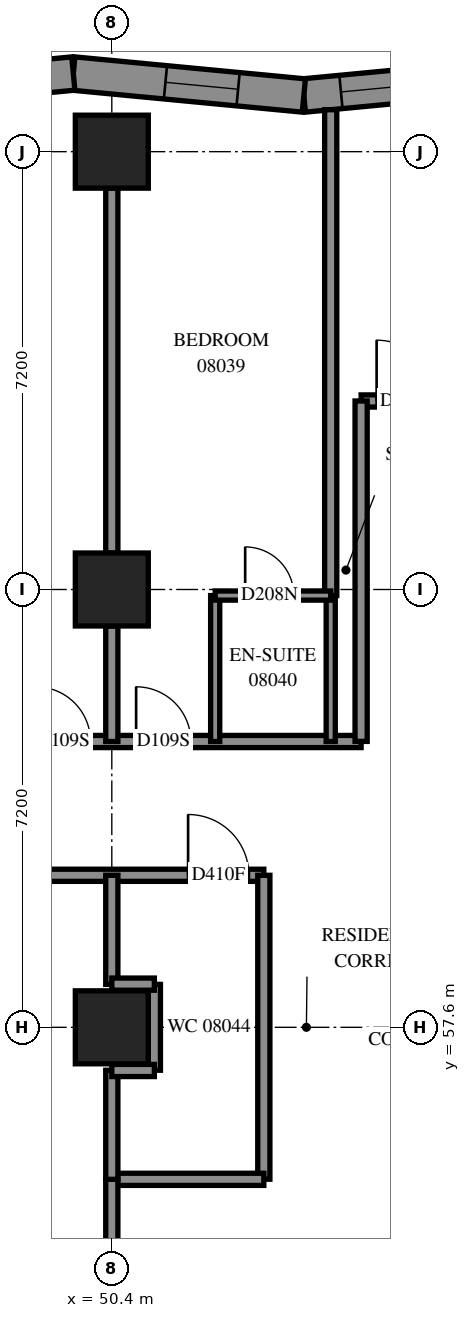
"""IFC4 building model, lengths in metres.
Left out: names, types, materials, properties, quantities, classifications, styles, units other than length and angle.
Written with IfcOpenShell. Run it as: python <this file> out.ifc"""

import sys

from ifc_helpers import new_model, si_unit, direction, frame, frame_2d, origin, origin_2d, place, context, subcontext, project, spatial, polyline, rectangle, outline, extrude, element, fill, save


model = new_model("IFC4")
c1 = context("Model", 3, precision=1e-05, world=origin(), true_north=direction((0.0, 1.0)))
c2 = subcontext(c1, "Body", "Model", "MODEL_VIEW")
j1 = project(units=[si_unit("LENGTHUNIT", "METRE"), si_unit("PLANEANGLEUNIT", "RADIAN")], contexts=[c1])
p1 = place(None, origin())
s1 = spatial("IfcSite", under=j1, at=p1, CompositionType="ELEMENT")
p2 = place(p1, origin())
s2 = spatial("IfcBuilding", under=s1, at=p2, CompositionType="ELEMENT")
p3 = place(p2, frame((0.0, 0.0, 33.8)))
s3 = spatial("IfcBuildingStorey", under=s2, at=p3, CompositionType="ELEMENT", Elevation=33.8)
for number, where, z_axis, x_axis in (
    (1, (50.4, 57.6, 0.0), (0.0, 0.0, 1.0), (1.0, 0.0, 0.0)),
    (2, (50.4, 64.8, 0.0), (0.0, 0.0, 1.0), (1.0, 0.0, 0.0)),
    (3, (50.4, 72.0, 0.0), (0.0, 0.0, 1.0), (1.0, 0.0, 0.0)),
):
    element("IfcColumn", number, at=place(p3, frame(where, z_axis=z_axis, x_axis=x_axis)), inside=s3, PredefinedType="COLUMN", context=c2, shape_type="SweptSolid", body=[
        extrude(rectangle(XDim=1.2, YDim=1.2, at=origin_2d()), origin(), (0.0, 0.0, 1.0), 3.1),
    ])
p4 = place(p3, frame((57.349, 73.285, 0.0), z_axis=(0.0, 0.0, 1.0), x_axis=(-0.9954966527, -0.0947967005, 0.0)))
e4 = element("IfcWall", 4, at=p4, inside=s3, PredefinedType="SOLIDWALL", context=c2, shape_type="SweptSolid", body=[
    extrude(outline(polyline([(-0.026, -0.275), (3.782, -0.275), (3.834, 0.275), (0.026, 0.275), (-0.026, -0.275)])), origin(), (0.0, 0.0, 1.0), 3.1),
])
p5 = place(p4, frame((0.395, 0.0, 0.5)))
e5 = element("IfcOpeningElement", 5, at=p5, cuts=e4, PredefinedType="OPENING", context=c2, shape_type="SweptSolid", body=[
    extrude(rectangle(XDim=2.8, YDim=2.45, at=frame_2d((1.4, 1.225))), frame((0.0, 0.285, 0.0), z_axis=(0.0, -1.0, 0.0), x_axis=(1.0, 0.0, 0.0)), (0.0, 0.0, 1.0), 0.57),
])
p6 = place(p3, frame((53.558, 72.924, 0.0), z_axis=(0.0, 0.0, 1.0), x_axis=(-0.9954966527, 0.0947967005, 0.0)))
e6 = element("IfcWall", 6, at=p6, inside=s3, PredefinedType="SOLIDWALL", context=c2, shape_type="SweptSolid", body=[
    extrude(outline(polyline([(0.026, -0.275), (3.834, -0.275), (3.782, 0.275), (-0.026, 0.275), (0.026, -0.275)])), origin(), (0.0, 0.0, 1.0), 3.1),
])
p7 = place(p6, frame((1.086, 0.0, 0.5)))
e7 = element("IfcOpeningElement", 7, at=p7, cuts=e6, PredefinedType="OPENING", context=c2, shape_type="SweptSolid", body=[
    extrude(rectangle(XDim=1.2, YDim=2.45, at=frame_2d((0.6, 1.225))), frame((0.0, 0.285, 0.0), z_axis=(0.0, -1.0, 0.0), x_axis=(1.0, 0.0, 0.0)), (0.0, 0.0, 1.0), 0.57),
])
p8 = place(p3, frame((49.767, 73.285, 0.0), z_axis=(0.0, 0.0, 1.0), x_axis=(-0.9954966527, -0.0947967005, 0.0)))
e8 = element("IfcWall", 8, at=p8, inside=s3, PredefinedType="SOLIDWALL", context=c2, shape_type="SweptSolid", body=[
    extrude(outline(polyline([(-0.026, -0.275), (3.782, -0.275), (3.834, 0.275), (0.026, 0.275), (-0.026, -0.275)])), origin(), (0.0, 0.0, 1.0), 3.1),
])
p9 = place(p8, frame((1.003, 0.0, 0.5)))
e9 = element("IfcOpeningElement", 9, at=p9, cuts=e8, PredefinedType="OPENING", context=c2, shape_type="SweptSolid", body=[
    extrude(rectangle(XDim=1.2, YDim=2.45, at=frame_2d((0.6, 1.225))), frame((0.0, 0.285, 0.0), z_axis=(0.0, -1.0, 0.0), x_axis=(1.0, 0.0, 0.0)), (0.0, 0.0, 1.0), 0.57),
])
p10 = place(p3, frame((28.8, 60.1, 0.0), z_axis=(0.0, 0.0, 1.0), x_axis=(1.0, 0.0, 0.0)))
e10 = element("IfcWall", 10, at=p10, inside=s3, PredefinedType="PARTITIONING", context=c2, shape_type="SweptSolid", body=[
    extrude(rectangle(XDim=24.1, YDim=0.2, at=frame_2d((12.05, 0.0))), origin(), (0.0, 0.0, 1.0), 3.1),
])
p11 = place(p10, frame((4.125, 0.0, 0.0)))
e11 = element("IfcOpeningElement", 11, at=p11, cuts=e10, PredefinedType="OPENING", context=c2, shape_type="SweptSolid", body=[
    extrude(rectangle(XDim=1.0, YDim=2.1, at=frame_2d((0.5, 1.05))), frame((0.0, 0.11, 0.0), z_axis=(0.0, -1.0, 0.0), x_axis=(1.0, 0.0, 0.0)), (0.0, 0.0, 1.0), 0.22),
])
p12 = place(p10, frame((11.62, 0.0, 0.0)))
e12 = element("IfcOpeningElement", 12, at=p12, cuts=e10, PredefinedType="OPENING", context=c2, shape_type="SweptSolid", body=[
    extrude(rectangle(XDim=0.9, YDim=2.1, at=frame_2d((0.45, 1.05))), frame((0.0, 0.11, 0.0), z_axis=(0.0, -1.0, 0.0), x_axis=(1.0, 0.0, 0.0)), (0.0, 0.0, 1.0), 0.22),
])
p13 = place(p10, frame((14.8, 0.0, 0.0)))
e13 = element("IfcOpeningElement", 13, at=p13, cuts=e10, PredefinedType="OPENING", context=c2, shape_type="SweptSolid", body=[
    extrude(rectangle(XDim=0.9, YDim=2.1, at=frame_2d((0.45, 1.05))), frame((0.0, 0.11, 0.0), z_axis=(0.0, -1.0, 0.0), x_axis=(1.0, 0.0, 0.0)), (0.0, 0.0, 1.0), 0.22),
])
p14 = place(p10, frame((18.835, 0.0, 0.0)))
e14 = element("IfcOpeningElement", 14, at=p14, cuts=e10, PredefinedType="OPENING", context=c2, shape_type="SweptSolid", body=[
    extrude(rectangle(XDim=1.0, YDim=2.1, at=frame_2d((0.5, 1.05))), frame((0.0, 0.11, 0.0), z_axis=(0.0, -1.0, 0.0), x_axis=(1.0, 0.0, 0.0)), (0.0, 0.0, 1.0), 0.22),
])
p15 = place(p10, frame((22.854, 0.0, 0.0)))
e15 = element("IfcOpeningElement", 15, at=p15, cuts=e10, PredefinedType="OPENING", context=c2, shape_type="SweptSolid", body=[
    extrude(rectangle(XDim=1.0, YDim=2.1, at=frame_2d((0.5, 1.05))), frame((0.0, 0.11, 0.0), z_axis=(0.0, -1.0, 0.0), x_axis=(1.0, 0.0, 0.0)), (0.0, 0.0, 1.0), 0.22),
])
p16 = place(p3, frame((33.502, 62.3, 0.0), z_axis=(0.0, 0.0, 1.0), x_axis=(1.0, 0.0, 0.0)))
e16 = element("IfcWall", 16, at=p16, inside=s3, PredefinedType="PARTITIONING", context=c2, shape_type="SweptSolid", body=[
    extrude(rectangle(XDim=20.998, YDim=0.2, at=frame_2d((10.499, 0.0))), origin(), (0.0, 0.0, 1.0), 3.1),
])
p17 = place(p16, frame((2.898, 0.0, 0.0)))
e17 = element("IfcOpeningElement", 17, at=p17, cuts=e16, PredefinedType="OPENING", context=c2, shape_type="SweptSolid", body=[
    extrude(rectangle(XDim=0.9, YDim=2.1, at=frame_2d((0.45, 1.05))), frame((0.0, 0.11, 0.0), z_axis=(0.0, -1.0, 0.0), x_axis=(1.0, 0.0, 0.0)), (0.0, 0.0, 1.0), 0.22),
])
p18 = place(p16, frame((8.448, 0.0, 0.0)))
e18 = element("IfcOpeningElement", 18, at=p18, cuts=e16, PredefinedType="OPENING", context=c2, shape_type="SweptSolid", body=[
    extrude(rectangle(XDim=0.9, YDim=2.1, at=frame_2d((0.45, 1.05))), frame((0.0, 0.11, 0.0), z_axis=(0.0, -1.0, 0.0), x_axis=(1.0, 0.0, 0.0)), (0.0, 0.0, 1.0), 0.22),
])
p19 = place(p16, frame((10.098, 0.0, 0.0)))
e19 = element("IfcOpeningElement", 19, at=p19, cuts=e16, PredefinedType="OPENING", context=c2, shape_type="SweptSolid", body=[
    extrude(rectangle(XDim=0.9, YDim=2.1, at=frame_2d((0.45, 1.05))), frame((0.0, 0.11, 0.0), z_axis=(0.0, -1.0, 0.0), x_axis=(1.0, 0.0, 0.0)), (0.0, 0.0, 1.0), 0.22),
])
p20 = place(p16, frame((15.648, 0.0, 0.0)))
e20 = element("IfcOpeningElement", 20, at=p20, cuts=e16, PredefinedType="OPENING", context=c2, shape_type="SweptSolid", body=[
    extrude(rectangle(XDim=0.9, YDim=2.1, at=frame_2d((0.45, 1.05))), frame((0.0, 0.11, 0.0), z_axis=(0.0, -1.0, 0.0), x_axis=(1.0, 0.0, 0.0)), (0.0, 0.0, 1.0), 0.22),
])
p21 = place(p16, frame((17.298, 0.0, 0.0)))
e21 = element("IfcOpeningElement", 21, at=p21, cuts=e16, PredefinedType="OPENING", context=c2, shape_type="SweptSolid", body=[
    extrude(rectangle(XDim=0.9, YDim=2.1, at=frame_2d((0.45, 1.05))), frame((0.0, 0.11, 0.0), z_axis=(0.0, -1.0, 0.0), x_axis=(1.0, 0.0, 0.0)), (0.0, 0.0, 1.0), 0.22),
])
p22 = place(p3, frame((54.5, 67.9, 0.0), z_axis=(0.0, 0.0, 1.0), x_axis=(1.0, 0.0, 0.0)))
e22 = element("IfcWall", 22, at=p22, inside=s3, PredefinedType="PARTITIONING", context=c2, shape_type="SweptSolid", body=[
    extrude(rectangle(XDim=20.6, YDim=0.2, at=frame_2d((10.3, 0.0))), origin(), (0.0, 0.0, 1.0), 3.1),
])
p23 = place(p22, frame((0.255, 0.0, 0.0)))
e23 = element("IfcOpeningElement", 23, at=p23, cuts=e22, PredefinedType="OPENING", context=c2, shape_type="SweptSolid", body=[
    extrude(rectangle(XDim=1.0, YDim=2.1, at=frame_2d((0.5, 1.05))), frame((0.0, 0.11, 0.0), z_axis=(0.0, -1.0, 0.0), x_axis=(1.0, 0.0, 0.0)), (0.0, 0.0, 1.0), 0.22),
])
p24 = place(p22, frame((19.345, 0.0, 0.0)))
e24 = element("IfcOpeningElement", 24, at=p24, cuts=e22, PredefinedType="OPENING", context=c2, shape_type="SweptSolid", body=[
    extrude(rectangle(XDim=1.0, YDim=2.1, at=frame_2d((0.5, 1.05))), frame((0.0, 0.11, 0.0), z_axis=(0.0, -1.0, 0.0), x_axis=(1.0, 0.0, 0.0)), (0.0, 0.0, 1.0), 0.22),
])
p25 = place(p22, frame((5.45, 0.0, 0.0)))
e25 = element("IfcOpeningElement", 25, at=p25, cuts=e22, PredefinedType="OPENING", context=c2, shape_type="SweptSolid", body=[
    extrude(rectangle(XDim=0.9, YDim=2.1, at=frame_2d((0.45, 1.05))), frame((0.0, 0.11, 0.0), z_axis=(0.0, -1.0, 0.0), x_axis=(1.0, 0.0, 0.0)), (0.0, 0.0, 1.0), 0.22),
])
p26 = place(p22, frame((7.1, 0.0, 0.0)))
e26 = element("IfcOpeningElement", 26, at=p26, cuts=e22, PredefinedType="OPENING", context=c2, shape_type="SweptSolid", body=[
    extrude(rectangle(XDim=0.9, YDim=2.1, at=frame_2d((0.45, 1.05))), frame((0.0, 0.11, 0.0), z_axis=(0.0, -1.0, 0.0), x_axis=(1.0, 0.0, 0.0)), (0.0, 0.0, 1.0), 0.22),
])
p27 = place(p22, frame((12.65, 0.0, 0.0)))
e27 = element("IfcOpeningElement", 27, at=p27, cuts=e22, PredefinedType="OPENING", context=c2, shape_type="SweptSolid", body=[
    extrude(rectangle(XDim=0.9, YDim=2.1, at=frame_2d((0.45, 1.05))), frame((0.0, 0.11, 0.0), z_axis=(0.0, -1.0, 0.0), x_axis=(1.0, 0.0, 0.0)), (0.0, 0.0, 1.0), 0.22),
])
p28 = place(p22, frame((14.3, 0.0, 0.0)))
e28 = element("IfcOpeningElement", 28, at=p28, cuts=e22, PredefinedType="OPENING", context=c2, shape_type="SweptSolid", body=[
    extrude(rectangle(XDim=0.9, YDim=2.1, at=frame_2d((0.45, 1.05))), frame((0.0, 0.11, 0.0), z_axis=(0.0, -1.0, 0.0), x_axis=(1.0, 0.0, 0.0)), (0.0, 0.0, 1.0), 0.22),
])
p29 = place(p3, frame((54.0, 64.7, 0.0), z_axis=(0.0, 0.0, 1.0), x_axis=(0.0, 1.0, 0.0)))
e29 = element("IfcWall", 29, at=p29, inside=s3, PredefinedType="PARTITIONING", context=c2, shape_type="SweptSolid", body=[
    extrude(rectangle(XDim=7.99, YDim=0.2, at=frame_2d((3.995, 0.0))), origin(), (0.0, 0.0, 1.0), 3.1),
])
p30 = place(p3, frame((50.4, 65.4, 0.0), z_axis=(0.0, 0.0, 1.0), x_axis=(0.0, 1.0, 0.0)))
e30 = element("IfcWall", 30, at=p30, inside=s3, PredefinedType="PARTITIONING", context=c2, shape_type="SweptSolid", body=[
    extrude(rectangle(XDim=6.0, YDim=0.2, at=frame_2d((3.0, 0.0))), origin(), (0.0, 0.0, 1.0), 3.1),
])
p31 = place(p3, frame((54.5, 62.302, 0.0), z_axis=(0.0, 0.0, 1.0), x_axis=(0.0, 1.0, 0.0)))
e31 = element("IfcWall", 31, at=p31, inside=s3, PredefinedType="PARTITIONING", context=c2, shape_type="SweptSolid", body=[
    extrude(rectangle(XDim=5.598, YDim=0.2, at=frame_2d((2.799, 0.0))), origin(), (0.0, 0.0, 1.0), 3.1),
])
p32 = place(p3, frame((52.9, 55.102, 0.0), z_axis=(0.0, 0.0, 1.0), x_axis=(0.0, 1.0, 0.0)))
e32 = element("IfcWall", 32, at=p32, inside=s3, PredefinedType="PARTITIONING", context=c2, shape_type="SweptSolid", body=[
    extrude(rectangle(XDim=4.998, YDim=0.2, at=frame_2d((2.499, 0.0))), origin(), (0.0, 0.0, 1.0), 3.1),
])
p33 = place(p3, frame((50.4, 55.1, 0.0), z_axis=(0.0, 0.0, 1.0), x_axis=(1.0, 0.0, 0.0)))
e33 = element("IfcWall", 33, at=p33, inside=s3, PredefinedType="PARTITIONING", context=c2, shape_type="SweptSolid", body=[
    extrude(rectangle(XDim=2.5, YDim=0.2, at=frame_2d((1.25, 0.0))), origin(), (0.0, 0.0, 1.0), 3.1),
])
for number, where, z_axis, x_axis in (
    (34, (52.1, 62.3, 0.0), (0.0, 0.0, 1.0), (0.0, 1.0, 0.0)),
    (35, (54.0, 62.3, 0.0), (0.0, 0.0, 1.0), (0.0, 1.0, 0.0)),
):
    element("IfcWall", number, at=place(p3, frame(where, z_axis=z_axis, x_axis=x_axis)), inside=s3, PredefinedType="PARTITIONING", context=c2, shape_type="SweptSolid", body=[
        extrude(rectangle(XDim=2.4, YDim=0.15, at=frame_2d((1.2, 0.0))), origin(), (0.0, 0.0, 1.0), 3.1),
    ])
p34 = place(p3, frame((50.4, 52.9, 0.0), z_axis=(0.0, 0.0, 1.0), x_axis=(0.0, 1.0, 0.0)))
e36 = element("IfcWall", 36, at=p34, inside=s3, PredefinedType="PARTITIONING", context=c2, shape_type="SweptSolid", body=[
    extrude(rectangle(XDim=2.2, YDim=0.2, at=frame_2d((1.1, 0.0))), origin(), (0.0, 0.0, 1.0), 3.1),
])
p35 = place(p3, frame((50.4, 62.3, 0.0), z_axis=(0.0, 0.0, 1.0), x_axis=(0.0, 1.0, 0.0)))
e37 = element("IfcWall", 37, at=p35, inside=s3, PredefinedType="PARTITIONING", context=c2, shape_type="SweptSolid", body=[
    extrude(rectangle(XDim=1.9, YDim=0.2, at=frame_2d((0.95, 0.0))), origin(), (0.0, 0.0, 1.0), 3.1),
])
p36 = place(p3, frame((52.1, 64.7, 0.0), z_axis=(0.0, 0.0, 1.0), x_axis=(1.0, 0.0, 0.0)))
e38 = element("IfcWall", 38, at=p36, inside=s3, PredefinedType="PARTITIONING", context=c2, shape_type="SweptSolid", body=[
    extrude(rectangle(XDim=1.9, YDim=0.15, at=frame_2d((0.95, 0.0))), origin(), (0.0, 0.0, 1.0), 3.1),
])
p37 = place(p36, frame((0.493, 0.0, 0.0)))
e39 = element("IfcOpeningElement", 39, at=p37, cuts=e38, PredefinedType="OPENING", context=c2, shape_type="SweptSolid", body=[
    extrude(rectangle(XDim=0.8, YDim=2.1, at=frame_2d((0.4, 1.05))), frame((0.0, 0.085, 0.0), z_axis=(0.0, -1.0, 0.0), x_axis=(1.0, 0.0, 0.0)), (0.0, 0.0, 1.0), 0.17),
])
for number, where, z_axis, x_axis in (
    (40, (50.4, 58.306, 0.0), (0.0, 0.0, 1.0), (0.0, 1.0, 0.0)),
    (41, (50.4, 55.1, 0.0), (0.0, 0.0, 1.0), (0.0, 1.0, 0.0)),
):
    element("IfcWall", number, at=place(p3, frame(where, z_axis=z_axis, x_axis=x_axis)), inside=s3, PredefinedType="PARTITIONING", context=c2, shape_type="SweptSolid", body=[
        extrude(rectangle(XDim=1.794, YDim=0.2, at=frame_2d((0.897, 0.0))), origin(), (0.0, 0.0, 1.0), 3.1),
    ])
p38 = place(p3, frame((51.1, 56.894, 0.0), z_axis=(0.0, 0.0, 1.0), x_axis=(0.0, 1.0, 0.0)))
e42 = element("IfcWall", 42, at=p38, inside=s3, PredefinedType="PARTITIONING", context=c2, shape_type="SweptSolid", body=[
    extrude(rectangle(XDim=1.412, YDim=0.2, at=frame_2d((0.706, 0.0))), origin(), (0.0, 0.0, 1.0), 3.1),
])
for number, where, z_axis, x_axis in (
    (43, (50.4, 58.31, 0.0), (0.0, 0.0, 1.0), (1.0, 0.0, 0.0)),
    (44, (50.4, 56.89, 0.0), (0.0, 0.0, 1.0), (1.0, 0.0, 0.0)),
):
    element("IfcWall", number, at=place(p3, frame(where, z_axis=z_axis, x_axis=x_axis)), inside=s3, PredefinedType="PARTITIONING", context=c2, shape_type="SweptSolid", body=[
        extrude(rectangle(XDim=0.7, YDim=0.2, at=frame_2d((0.35, 0.0))), origin(), (0.0, 0.0, 1.0), 3.1),
    ])
p39 = place(p5, origin())
e45 = element("IfcWindow", 45, at=p39, inside=s3, PartitioningType="SINGLE_PANEL", PredefinedType="WINDOW", context=c2, shape_type="SweptSolid", body=[
    extrude(rectangle(XDim=2.8, YDim=2.45, at=frame_2d((1.4, 1.225))), frame((0.0, 0.155, 0.0), z_axis=(0.0, -1.0, 0.0), x_axis=(1.0, 0.0, 0.0)), (0.0, 0.0, 1.0), 0.06),
])
fill(e5, e45)
p40 = place(p7, origin())
e46 = element("IfcWindow", 46, at=p40, inside=s3, PartitioningType="SINGLE_PANEL", PredefinedType="WINDOW", context=c2, shape_type="SweptSolid", body=[
    extrude(rectangle(XDim=1.2, YDim=2.45, at=frame_2d((0.6, 1.225))), frame((0.0, 0.155, 0.0), z_axis=(0.0, -1.0, 0.0), x_axis=(1.0, 0.0, 0.0)), (0.0, 0.0, 1.0), 0.06),
])
fill(e7, e46)
p41 = place(p20, origin())
e47 = element("IfcDoor", 47, at=p41, inside=s3, OperationType="SINGLE_SWING_LEFT", PredefinedType="DOOR", context=c2, shape_type="SweptSolid", body=[
    extrude(rectangle(XDim=0.9, YDim=2.1, at=frame_2d((0.45, 1.05))), frame((0.0, 0.025, 0.0), z_axis=(0.0, -1.0, 0.0), x_axis=(1.0, 0.0, 0.0)), (0.0, 0.0, 1.0), 0.05),
])
fill(e20, e47)
p42 = place(p21, origin())
e48 = element("IfcDoor", 48, at=p42, inside=s3, OperationType="SINGLE_SWING_RIGHT", PredefinedType="DOOR", context=c2, shape_type="SweptSolid", body=[
    extrude(rectangle(XDim=0.9, YDim=2.1, at=frame_2d((0.45, 1.05))), frame((0.0, 0.025, 0.0), z_axis=(0.0, -1.0, 0.0), x_axis=(1.0, 0.0, 0.0)), (0.0, 0.0, 1.0), 0.05),
])
fill(e21, e48)
p43 = place(p37, origin())
e49 = element("IfcDoor", 49, at=p43, inside=s3, OperationType="SINGLE_SWING_RIGHT", PredefinedType="DOOR", context=c2, shape_type="SweptSolid", body=[
    extrude(rectangle(XDim=0.8, YDim=2.1, at=frame_2d((0.4, 1.05))), frame((0.0, 0.025, 0.0), z_axis=(0.0, -1.0, 0.0), x_axis=(1.0, 0.0, 0.0)), (0.0, 0.0, 1.0), 0.05),
])
fill(e39, e49)
p44 = place(p23, origin())
e50 = element("IfcDoor", 50, at=p44, inside=s3, OperationType="SINGLE_SWING_LEFT", PredefinedType="DOOR", context=c2, shape_type="SweptSolid", body=[
    extrude(rectangle(XDim=1.0, YDim=2.1, at=frame_2d((0.5, 1.05))), frame((0.0, 0.025, 0.0), z_axis=(0.0, -1.0, 0.0), x_axis=(1.0, 0.0, 0.0)), (0.0, 0.0, 1.0), 0.05),
])
fill(e23, e50)
p45 = place(p15, origin())
e51 = element("IfcDoor", 51, at=p45, inside=s3, OperationType="SINGLE_SWING_LEFT", PredefinedType="DOOR", context=c2, shape_type="SweptSolid", body=[
    extrude(rectangle(XDim=1.0, YDim=2.1, at=frame_2d((0.5, 1.05))), frame((0.0, 0.025, 0.0), z_axis=(0.0, -1.0, 0.0), x_axis=(1.0, 0.0, 0.0)), (0.0, 0.0, 1.0), 0.05),
])
fill(e15, e51)
save(model, sys.argv[1])
